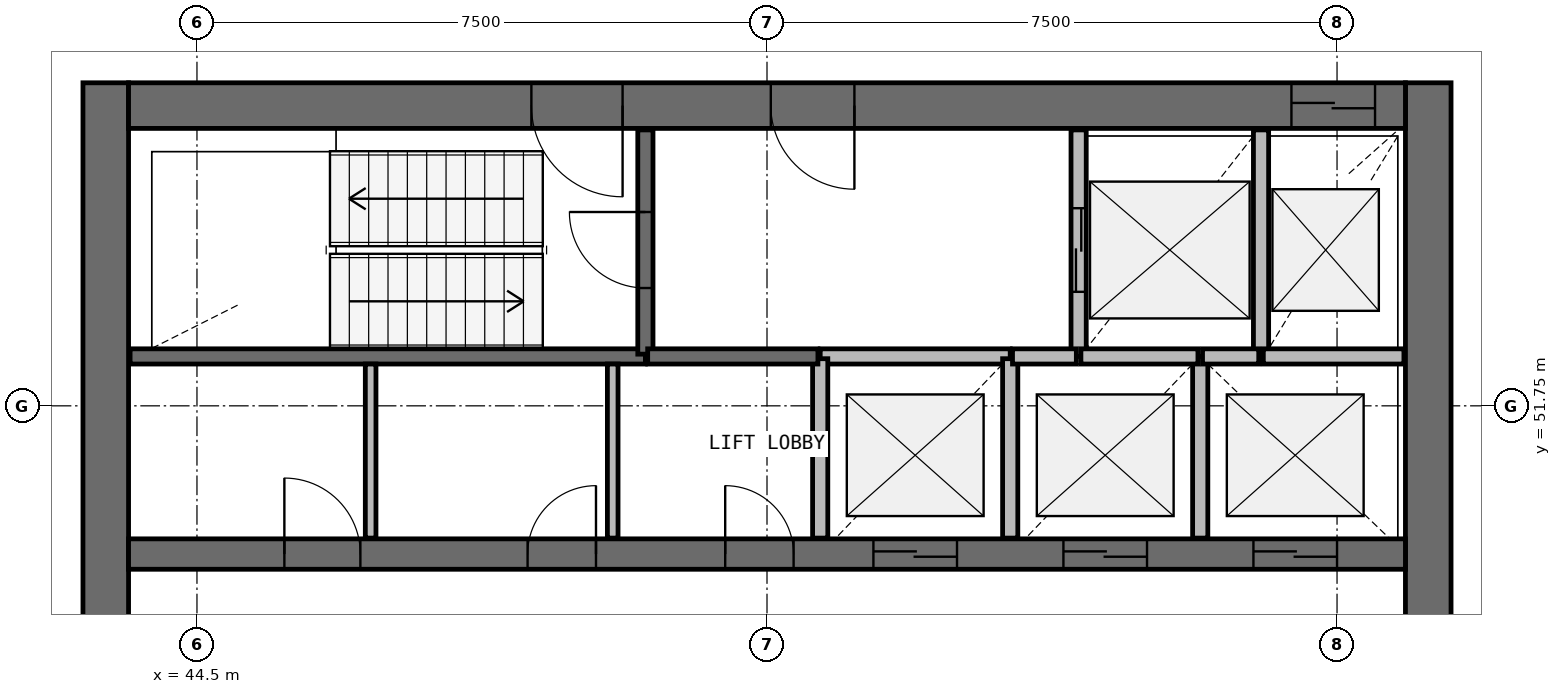
"""IFC4 building model, lengths in metres.
Left out: names, types, materials, properties, quantities, classifications, styles, units other than length and angle.
Written with IfcOpenShell. Run it as: python <this file> out.ifc"""

import sys

from ifc_helpers import new_model, si_unit, direction, frame, frame_2d, origin, place, context, subcontext, project, spatial, rectangle, extrude, source, transform, mapped, element, fill, save


model = new_model("IFC4")
c1 = context("Model", 3, precision=1e-05, world=origin(), true_north=direction((0.0, 1.0)))
c2 = subcontext(c1, "Body", "Model", "MODEL_VIEW")
j1 = project(units=[si_unit("LENGTHUNIT", "METRE"), si_unit("PLANEANGLEUNIT", "RADIAN")], contexts=[c1])
p1 = place(None, origin())
s1 = spatial("IfcSite", under=j1, at=p1, CompositionType="ELEMENT")
p2 = place(p1, origin())
s2 = spatial("IfcBuilding", under=s1, at=p2, CompositionType="ELEMENT")
p3 = place(p2, frame((0.0, 0.0, 238.4)))
s3 = spatial("IfcBuildingStorey", under=s2, at=p3, CompositionType="ELEMENT", Elevation=238.4)
p4 = place(p3, frame((60.7, 40.0, 0.0), z_axis=(0.0, 0.0, 1.0), x_axis=(0.0, 1.0, 0.0)))
e1 = element("IfcWall", 1, at=p4, inside=s3, PredefinedType="SHEAR", context=c2, shape_type="SweptSolid", body=[
    extrude(rectangle(XDim=16.0, YDim=0.6, at=frame_2d((8.0, 0.0))), origin(), (0.0, 0.0, 1.0), 3.9),
])
p5 = place(p4, frame((7.1, 0.0, 0.0)))
e2 = element("IfcOpeningElement", 2, at=p5, cuts=e1, PredefinedType="OPENING", context=c2, shape_type="SweptSolid", body=[
    extrude(rectangle(XDim=1.8, YDim=2.1, at=frame_2d((0.9, 1.05))), frame((0.0, 0.31, 0.0), z_axis=(0.0, -1.0, 0.0), x_axis=(1.0, 0.0, 0.0)), (0.0, 0.0, 1.0), 0.62),
])
p6 = place(p3, frame((43.3, 56.0, 0.0), z_axis=(0.0, 0.0, 1.0), x_axis=(0.0, -1.0, 0.0)))
e3 = element("IfcWall", 3, at=p6, inside=s3, PredefinedType="SHEAR", context=c2, shape_type="SweptSolid", body=[
    extrude(rectangle(XDim=16.0, YDim=0.6, at=frame_2d((8.0, 0.0))), origin(), (0.0, 0.0, 1.0), 3.9),
])
p7 = place(p6, frame((7.1, 0.0, 0.0)))
e4 = element("IfcOpeningElement", 4, at=p7, cuts=e3, PredefinedType="OPENING", context=c2, shape_type="SweptSolid", body=[
    extrude(rectangle(XDim=1.8, YDim=2.1, at=frame_2d((0.9, 1.05))), frame((0.0, 0.31, 0.0), z_axis=(0.0, -1.0, 0.0), x_axis=(1.0, 0.0, 0.0)), (0.0, 0.0, 1.0), 0.62),
])
p8 = place(p3, frame((60.4, 55.7, 0.0), z_axis=(0.0, 0.0, 1.0), x_axis=(-1.0, 0.0, 0.0)))
e5 = element("IfcWall", 5, at=p8, inside=s3, PredefinedType="SHEAR", context=c2, shape_type="SweptSolid", body=[
    extrude(rectangle(XDim=16.8, YDim=0.6, at=frame_2d((8.4, 0.0))), origin(), (0.0, 0.0, 1.0), 3.9),
])
p9 = place(p8, frame((0.4, 0.0, 0.0)))
e6 = element("IfcOpeningElement", 6, at=p9, cuts=e5, PredefinedType="OPENING", context=c2, shape_type="SweptSolid", body=[
    extrude(rectangle(XDim=1.1, YDim=2.1, at=frame_2d((0.55, 1.05))), frame((0.0, 0.31, 0.0), z_axis=(0.0, -1.0, 0.0), x_axis=(1.0, 0.0, 0.0)), (0.0, 0.0, 1.0), 0.62),
])
p10 = place(p8, frame((10.3, 0.0, 0.0)))
e7 = element("IfcOpeningElement", 7, at=p10, cuts=e5, PredefinedType="OPENING", context=c2, shape_type="SweptSolid", body=[
    extrude(rectangle(XDim=1.2, YDim=2.1, at=frame_2d((0.6, 1.05))), frame((0.0, 0.31, 0.0), z_axis=(0.0, -1.0, 0.0), x_axis=(1.0, 0.0, 0.0)), (0.0, 0.0, 1.0), 0.62),
])
p11 = place(p8, frame((7.25, 0.0, 0.0)))
e8 = element("IfcOpeningElement", 8, at=p11, cuts=e5, PredefinedType="OPENING", context=c2, shape_type="SweptSolid", body=[
    extrude(rectangle(XDim=1.1, YDim=2.1, at=frame_2d((0.55, 1.05))), frame((0.0, 0.31, 0.0), z_axis=(0.0, -1.0, 0.0), x_axis=(1.0, 0.0, 0.0)), (0.0, 0.0, 1.0), 0.62),
])
p12 = place(p3, frame((43.6, 49.8, 0.0), z_axis=(0.0, 0.0, 1.0), x_axis=(1.0, 0.0, 0.0)))
e9 = element("IfcWall", 9, at=p12, inside=s3, PredefinedType="SHEAR", context=c2, shape_type="SweptSolid", body=[
    extrude(rectangle(XDim=16.8, YDim=0.4, at=frame_2d((8.4, 0.0))), origin(), (0.0, 0.0, 1.0), 3.9),
])
p13 = place(p12, frame((9.8, 0.0, 0.0)))
e10 = element("IfcOpeningElement", 10, at=p13, cuts=e9, PredefinedType="OPENING", context=c2, shape_type="SweptSolid", body=[
    extrude(rectangle(XDim=1.1, YDim=2.1, at=frame_2d((0.55, 1.05))), frame((0.0, 0.21, 0.0), z_axis=(0.0, -1.0, 0.0), x_axis=(1.0, 0.0, 0.0)), (0.0, 0.0, 1.0), 0.42),
])
p14 = place(p12, frame((12.3, 0.0, 0.0)))
e11 = element("IfcOpeningElement", 11, at=p14, cuts=e9, PredefinedType="OPENING", context=c2, shape_type="SweptSolid", body=[
    extrude(rectangle(XDim=1.1, YDim=2.1, at=frame_2d((0.55, 1.05))), frame((0.0, 0.21, 0.0), z_axis=(0.0, -1.0, 0.0), x_axis=(1.0, 0.0, 0.0)), (0.0, 0.0, 1.0), 0.42),
])
p15 = place(p12, frame((14.8, 0.0, 0.0)))
e12 = element("IfcOpeningElement", 12, at=p15, cuts=e9, PredefinedType="OPENING", context=c2, shape_type="SweptSolid", body=[
    extrude(rectangle(XDim=1.1, YDim=2.1, at=frame_2d((0.55, 1.05))), frame((0.0, 0.21, 0.0), z_axis=(0.0, -1.0, 0.0), x_axis=(1.0, 0.0, 0.0)), (0.0, 0.0, 1.0), 0.42),
])
p16 = place(p12, frame((2.05, 0.0, 0.0)))
e13 = element("IfcOpeningElement", 13, at=p16, cuts=e9, PredefinedType="OPENING", context=c2, shape_type="SweptSolid", body=[
    extrude(rectangle(XDim=1.0, YDim=2.1, at=frame_2d((0.5, 1.05))), frame((0.0, 0.21, 0.0), z_axis=(0.0, -1.0, 0.0), x_axis=(1.0, 0.0, 0.0)), (0.0, 0.0, 1.0), 0.42),
])
p17 = place(p12, frame((5.25, 0.0, 0.0)))
e14 = element("IfcOpeningElement", 14, at=p17, cuts=e9, PredefinedType="OPENING", context=c2, shape_type="SweptSolid", body=[
    extrude(rectangle(XDim=0.9, YDim=2.1, at=frame_2d((0.45, 1.05))), frame((0.0, 0.21, 0.0), z_axis=(0.0, -1.0, 0.0), x_axis=(1.0, 0.0, 0.0)), (0.0, 0.0, 1.0), 0.42),
])
p18 = place(p12, frame((7.85, 0.0, 0.0)))
e15 = element("IfcOpeningElement", 15, at=p18, cuts=e9, PredefinedType="OPENING", context=c2, shape_type="SweptSolid", body=[
    extrude(rectangle(XDim=0.9, YDim=2.1, at=frame_2d((0.45, 1.05))), frame((0.0, 0.21, 0.0), z_axis=(0.0, -1.0, 0.0), x_axis=(1.0, 0.0, 0.0)), (0.0, 0.0, 1.0), 0.42),
])
p19 = place(p3, frame((43.62, 52.4, 0.0), z_axis=(0.0, 0.0, 1.0), x_axis=(1.0, 0.0, 0.0)))
e16 = element("IfcWall", 16, at=p19, inside=s3, PredefinedType="SOLIDWALL", context=c2, shape_type="SweptSolid", body=[
    extrude(rectangle(XDim=6.78, YDim=0.2, at=frame_2d((3.39, 0.0))), origin(), (0.0, 0.0, 1.0), 3.58),
])
p20 = place(p3, frame((50.4, 52.43, 0.0), z_axis=(0.0, 0.0, 1.0), x_axis=(0.0, 1.0, 0.0)))
e17 = element("IfcWall", 17, at=p20, inside=s3, PredefinedType="SOLIDWALL", context=c2, shape_type="SweptSolid", body=[
    extrude(rectangle(XDim=2.95, YDim=0.2, at=frame_2d((1.475, 0.0))), origin(), (0.0, 0.0, 1.0), 3.58),
])
p21 = place(p20, frame((0.87, 0.0, 0.0)))
e18 = element("IfcOpeningElement", 18, at=p21, cuts=e17, PredefinedType="OPENING", context=c2, shape_type="SweptSolid", body=[
    extrude(rectangle(XDim=1.0, YDim=2.1, at=frame_2d((0.5, 1.05))), frame((0.0, 0.11, 0.0), z_axis=(0.0, -1.0, 0.0), x_axis=(1.0, 0.0, 0.0)), (0.0, 0.0, 1.0), 0.22),
])
p22 = place(p3, frame((56.1, 55.38, 0.0), z_axis=(0.0, 0.0, 1.0), x_axis=(0.0, -1.0, 0.0)))
e19 = element("IfcWall", 19, at=p22, inside=s3, PredefinedType="SOLIDWALL", context=c2, shape_type="SweptSolid", body=[
    extrude(rectangle(XDim=2.98, YDim=0.2, at=frame_2d((1.49, 0.0))), origin(), (0.0, 0.0, 1.0), 3.58),
])
p23 = place(p22, frame((1.03, 0.0, 0.0)))
e20 = element("IfcOpeningElement", 20, at=p23, cuts=e19, PredefinedType="OPENING", context=c2, shape_type="SweptSolid", body=[
    extrude(rectangle(XDim=1.1, YDim=2.1, at=frame_2d((0.55, 1.05))), frame((0.0, 0.11, 0.0), z_axis=(0.0, -1.0, 0.0), x_axis=(1.0, 0.0, 0.0)), (0.0, 0.0, 1.0), 0.22),
])
p24 = place(p3, frame((58.5, 52.4, 0.0), z_axis=(0.0, 0.0, 1.0), x_axis=(0.0, 1.0, 0.0)))
e21 = element("IfcWall", 21, at=p24, inside=s3, PredefinedType="SOLIDWALL", context=c2, shape_type="SweptSolid", body=[
    extrude(rectangle(XDim=2.98, YDim=0.2, at=frame_2d((1.49, 0.0))), origin(), (0.0, 0.0, 1.0), 3.58),
])
p25 = place(p3, frame((55.2, 52.4, 0.0), z_axis=(0.0, 0.0, 1.0), x_axis=(-1.0, 0.0, 0.0)))
e22 = element("IfcWall", 22, at=p25, inside=s3, PredefinedType="SOLIDWALL", context=c2, shape_type="SweptSolid", body=[
    extrude(rectangle(XDim=2.5, YDim=0.2, at=frame_2d((1.25, 0.0))), origin(), (0.0, 0.0, 1.0), 3.58),
])
for number, where, z_axis, x_axis in (
    (23, (52.7, 52.37, 0.0), (0.0, 0.0, 1.0), (0.0, -1.0, 0.0)),
    (24, (55.2, 50.01, 0.0), (0.0, 0.0, 1.0), (0.0, 1.0, 0.0)),
):
    element("IfcWall", number, at=place(p3, frame(where, z_axis=z_axis, x_axis=x_axis)), inside=s3, PredefinedType="SOLIDWALL", context=c2, shape_type="SweptSolid", body=[
        extrude(rectangle(XDim=2.36, YDim=0.2, at=frame_2d((1.18, 0.0))), origin(), (0.0, 0.0, 1.0), 3.58),
    ])
p26 = place(p3, frame((57.7, 50.01, 0.0), z_axis=(0.0, 0.0, 1.0), x_axis=(0.0, 1.0, 0.0)))
e25 = element("IfcWall", 25, at=p26, inside=s3, PredefinedType="SOLIDWALL", context=c2, shape_type="SweptSolid", body=[
    extrude(rectangle(XDim=2.39, YDim=0.2, at=frame_2d((1.195, 0.0))), origin(), (0.0, 0.0, 1.0), 3.58),
])
p27 = place(p3, frame((50.43, 52.4, 0.0), z_axis=(0.0, 0.0, 1.0), x_axis=(1.0, 0.0, 0.0)))
e26 = element("IfcWall", 26, at=p27, inside=s3, PredefinedType="SOLIDWALL", context=c2, shape_type="SweptSolid", body=[
    extrude(rectangle(XDim=2.24, YDim=0.2, at=frame_2d((1.12, 0.0))), origin(), (0.0, 0.0, 1.0), 3.58),
])
p28 = place(p3, frame((60.38, 52.4, 0.0), z_axis=(0.0, 0.0, 1.0), x_axis=(-1.0, 0.0, 0.0)))
e27 = element("IfcWall", 27, at=p28, inside=s3, PredefinedType="SOLIDWALL", context=c2, shape_type="SweptSolid", body=[
    extrude(rectangle(XDim=1.85, YDim=0.2, at=frame_2d((0.925, 0.0))), origin(), (0.0, 0.0, 1.0), 3.58),
])
p29 = place(p3, frame((57.67, 52.4, 0.0), z_axis=(0.0, 0.0, 1.0), x_axis=(-1.0, 0.0, 0.0)))
e28 = element("IfcWall", 28, at=p29, inside=s3, PredefinedType="SOLIDWALL", context=c2, shape_type="SweptSolid", body=[
    extrude(rectangle(XDim=1.54, YDim=0.2, at=frame_2d((0.77, 0.0))), origin(), (0.0, 0.0, 1.0), 3.58),
])
p30 = place(p3, frame((56.07, 52.4, 0.0), z_axis=(0.0, 0.0, 1.0), x_axis=(-1.0, 0.0, 0.0)))
e29 = element("IfcWall", 29, at=p30, inside=s3, PredefinedType="SOLIDWALL", context=c2, shape_type="SweptSolid", body=[
    extrude(rectangle(XDim=0.84, YDim=0.2, at=frame_2d((0.42, 0.0))), origin(), (0.0, 0.0, 1.0), 3.58),
])
p31 = place(p3, frame((58.47, 52.4, 0.0), z_axis=(0.0, 0.0, 1.0), x_axis=(-1.0, 0.0, 0.0)))
e30 = element("IfcWall", 30, at=p31, inside=s3, PredefinedType="SOLIDWALL", context=c2, shape_type="SweptSolid", body=[
    extrude(rectangle(XDim=0.74, YDim=0.2, at=frame_2d((0.37, 0.0))), origin(), (0.0, 0.0, 1.0), 3.58),
])
for number, where, z_axis, x_axis in (
    (31, (46.785, 50.01, 0.0), (0.0, 0.0, 1.0), (0.0, 1.0, 0.0)),
    (32, (49.97, 50.01, 0.0), (0.0, 0.0, 1.0), (0.0, 1.0, 0.0)),
):
    element("IfcWall", number, at=place(p3, frame(where, z_axis=z_axis, x_axis=x_axis)), inside=s3, PredefinedType="PARTITIONING", context=c2, shape_type="SweptSolid", body=[
        extrude(rectangle(XDim=2.29, YDim=0.14, at=frame_2d((1.145, 0.0))), origin(), (0.0, 0.0, 1.0), 2.88),
    ])
m1 = source(origin(), c2, "Body", "SweptSolid", [
    extrude(rectangle(XDim=1.1, YDim=2.1, at=frame_2d((0.55, 1.05))), frame((0.0, 0.025, 0.0), z_axis=(0.0, -1.0, 0.0), x_axis=(1.0, 0.0, 0.0)), (0.0, 0.0, 1.0), 0.05),
])
p32 = place(p13, origin())
e33 = element("IfcDoor", 33, at=p32, inside=s3, OperationType="DOUBLE_DOOR_SLIDING", PredefinedType="USERDEFINED", context=c2, shape_type="MappedRepresentation", body=[
    mapped(m1, transform((0.0, 0.0, 0.0), scale=1.0)),
])
fill(e10, e33)
p33 = place(p14, origin())
e34 = element("IfcDoor", 34, at=p33, inside=s3, OperationType="DOUBLE_DOOR_SLIDING", PredefinedType="USERDEFINED", context=c2, shape_type="MappedRepresentation", body=[
    mapped(m1, transform((0.0, 0.0, 0.0), scale=1.0)),
])
fill(e11, e34)
p34 = place(p15, origin())
e35 = element("IfcDoor", 35, at=p34, inside=s3, OperationType="DOUBLE_DOOR_SLIDING", PredefinedType="USERDEFINED", context=c2, shape_type="MappedRepresentation", body=[
    mapped(m1, transform((0.0, 0.0, 0.0), scale=1.0)),
])
fill(e12, e35)
p35 = place(p23, origin())
e36 = element("IfcDoor", 36, at=p35, inside=s3, OperationType="DOUBLE_DOOR_SLIDING", PredefinedType="USERDEFINED", context=c2, shape_type="MappedRepresentation", body=[
    mapped(m1, transform((0.0, 0.0, 0.0), scale=1.0)),
])
fill(e20, e36)
p36 = place(p9, origin())
e37 = element("IfcDoor", 37, at=p36, inside=s3, OperationType="DOUBLE_DOOR_SLIDING", PredefinedType="USERDEFINED", context=c2, shape_type="MappedRepresentation", body=[
    mapped(m1, transform((0.0, 0.0, 0.0), scale=1.0)),
])
fill(e6, e37)
m2 = source(origin(), c2, "Body", "SweptSolid", [
    extrude(rectangle(XDim=1.2, YDim=2.1, at=frame_2d((0.6, 1.05))), frame((0.0, 0.025, 0.0), z_axis=(0.0, -1.0, 0.0), x_axis=(1.0, 0.0, 0.0)), (0.0, 0.0, 1.0), 0.05),
])
p37 = place(p10, origin())
e38 = element("IfcDoor", 38, at=p37, inside=s3, OperationType="SINGLE_SWING_LEFT", PredefinedType="DOOR", context=c2, shape_type="MappedRepresentation", body=[
    mapped(m2, transform((0.0, 0.0, 0.0), scale=1.0)),
])
fill(e7, e38)
m3 = source(origin(), c2, "Body", "SweptSolid", [
    extrude(rectangle(XDim=1.0, YDim=2.1, at=frame_2d((0.5, 1.05))), frame((0.0, 0.025, 0.0), z_axis=(0.0, -1.0, 0.0), x_axis=(1.0, 0.0, 0.0)), (0.0, 0.0, 1.0), 0.05),
])
p38 = place(p21, origin())
e39 = element("IfcDoor", 39, at=p38, inside=s3, OperationType="SINGLE_SWING_RIGHT", PredefinedType="DOOR", context=c2, shape_type="MappedRepresentation", body=[
    mapped(m3, transform((0.0, 0.0, 0.0), scale=1.0)),
])
fill(e18, e39)
m4 = source(origin(), c2, "Body", "SweptSolid", [
    extrude(rectangle(XDim=1.1, YDim=2.1, at=frame_2d((0.55, 1.05))), frame((0.0, 0.025, 0.0), z_axis=(0.0, -1.0, 0.0), x_axis=(1.0, 0.0, 0.0)), (0.0, 0.0, 1.0), 0.05),
])
p39 = place(p11, origin())
e40 = element("IfcDoor", 40, at=p39, inside=s3, OperationType="SINGLE_SWING_LEFT", PredefinedType="DOOR", context=c2, shape_type="MappedRepresentation", body=[
    mapped(m4, transform((0.0, 0.0, 0.0), scale=1.0)),
])
fill(e8, e40)
m5 = source(origin(), c2, "Body", "SweptSolid", [
    extrude(rectangle(XDim=1.0, YDim=2.1, at=frame_2d((0.5, 1.05))), frame((0.0, 0.025, 0.0), z_axis=(0.0, -1.0, 0.0), x_axis=(1.0, 0.0, 0.0)), (0.0, 0.0, 1.0), 0.05),
])
p40 = place(p16, origin())
e41 = element("IfcDoor", 41, at=p40, inside=s3, OperationType="SINGLE_SWING_LEFT", PredefinedType="DOOR", context=c2, shape_type="MappedRepresentation", body=[
    mapped(m5, transform((0.0, 0.0, 0.0), scale=1.0)),
])
fill(e13, e41)
m6 = source(origin(), c2, "Body", "SweptSolid", [
    extrude(rectangle(XDim=0.9, YDim=2.1, at=frame_2d((0.45, 1.05))), frame((0.0, 0.025, 0.0), z_axis=(0.0, -1.0, 0.0), x_axis=(1.0, 0.0, 0.0)), (0.0, 0.0, 1.0), 0.05),
])
p41 = place(p17, origin())
e42 = element("IfcDoor", 42, at=p41, inside=s3, OperationType="SINGLE_SWING_RIGHT", PredefinedType="DOOR", context=c2, shape_type="MappedRepresentation", body=[
    mapped(m6, transform((0.0, 0.0, 0.0), scale=1.0)),
])
fill(e14, e42)
p42 = place(p18, origin())
e43 = element("IfcDoor", 43, at=p42, inside=s3, OperationType="SINGLE_SWING_LEFT", PredefinedType="DOOR", context=c2, shape_type="MappedRepresentation", body=[
    mapped(m6, transform((0.0, 0.0, 0.0), scale=1.0)),
])
fill(e15, e43)
save(model, sys.argv[1])
